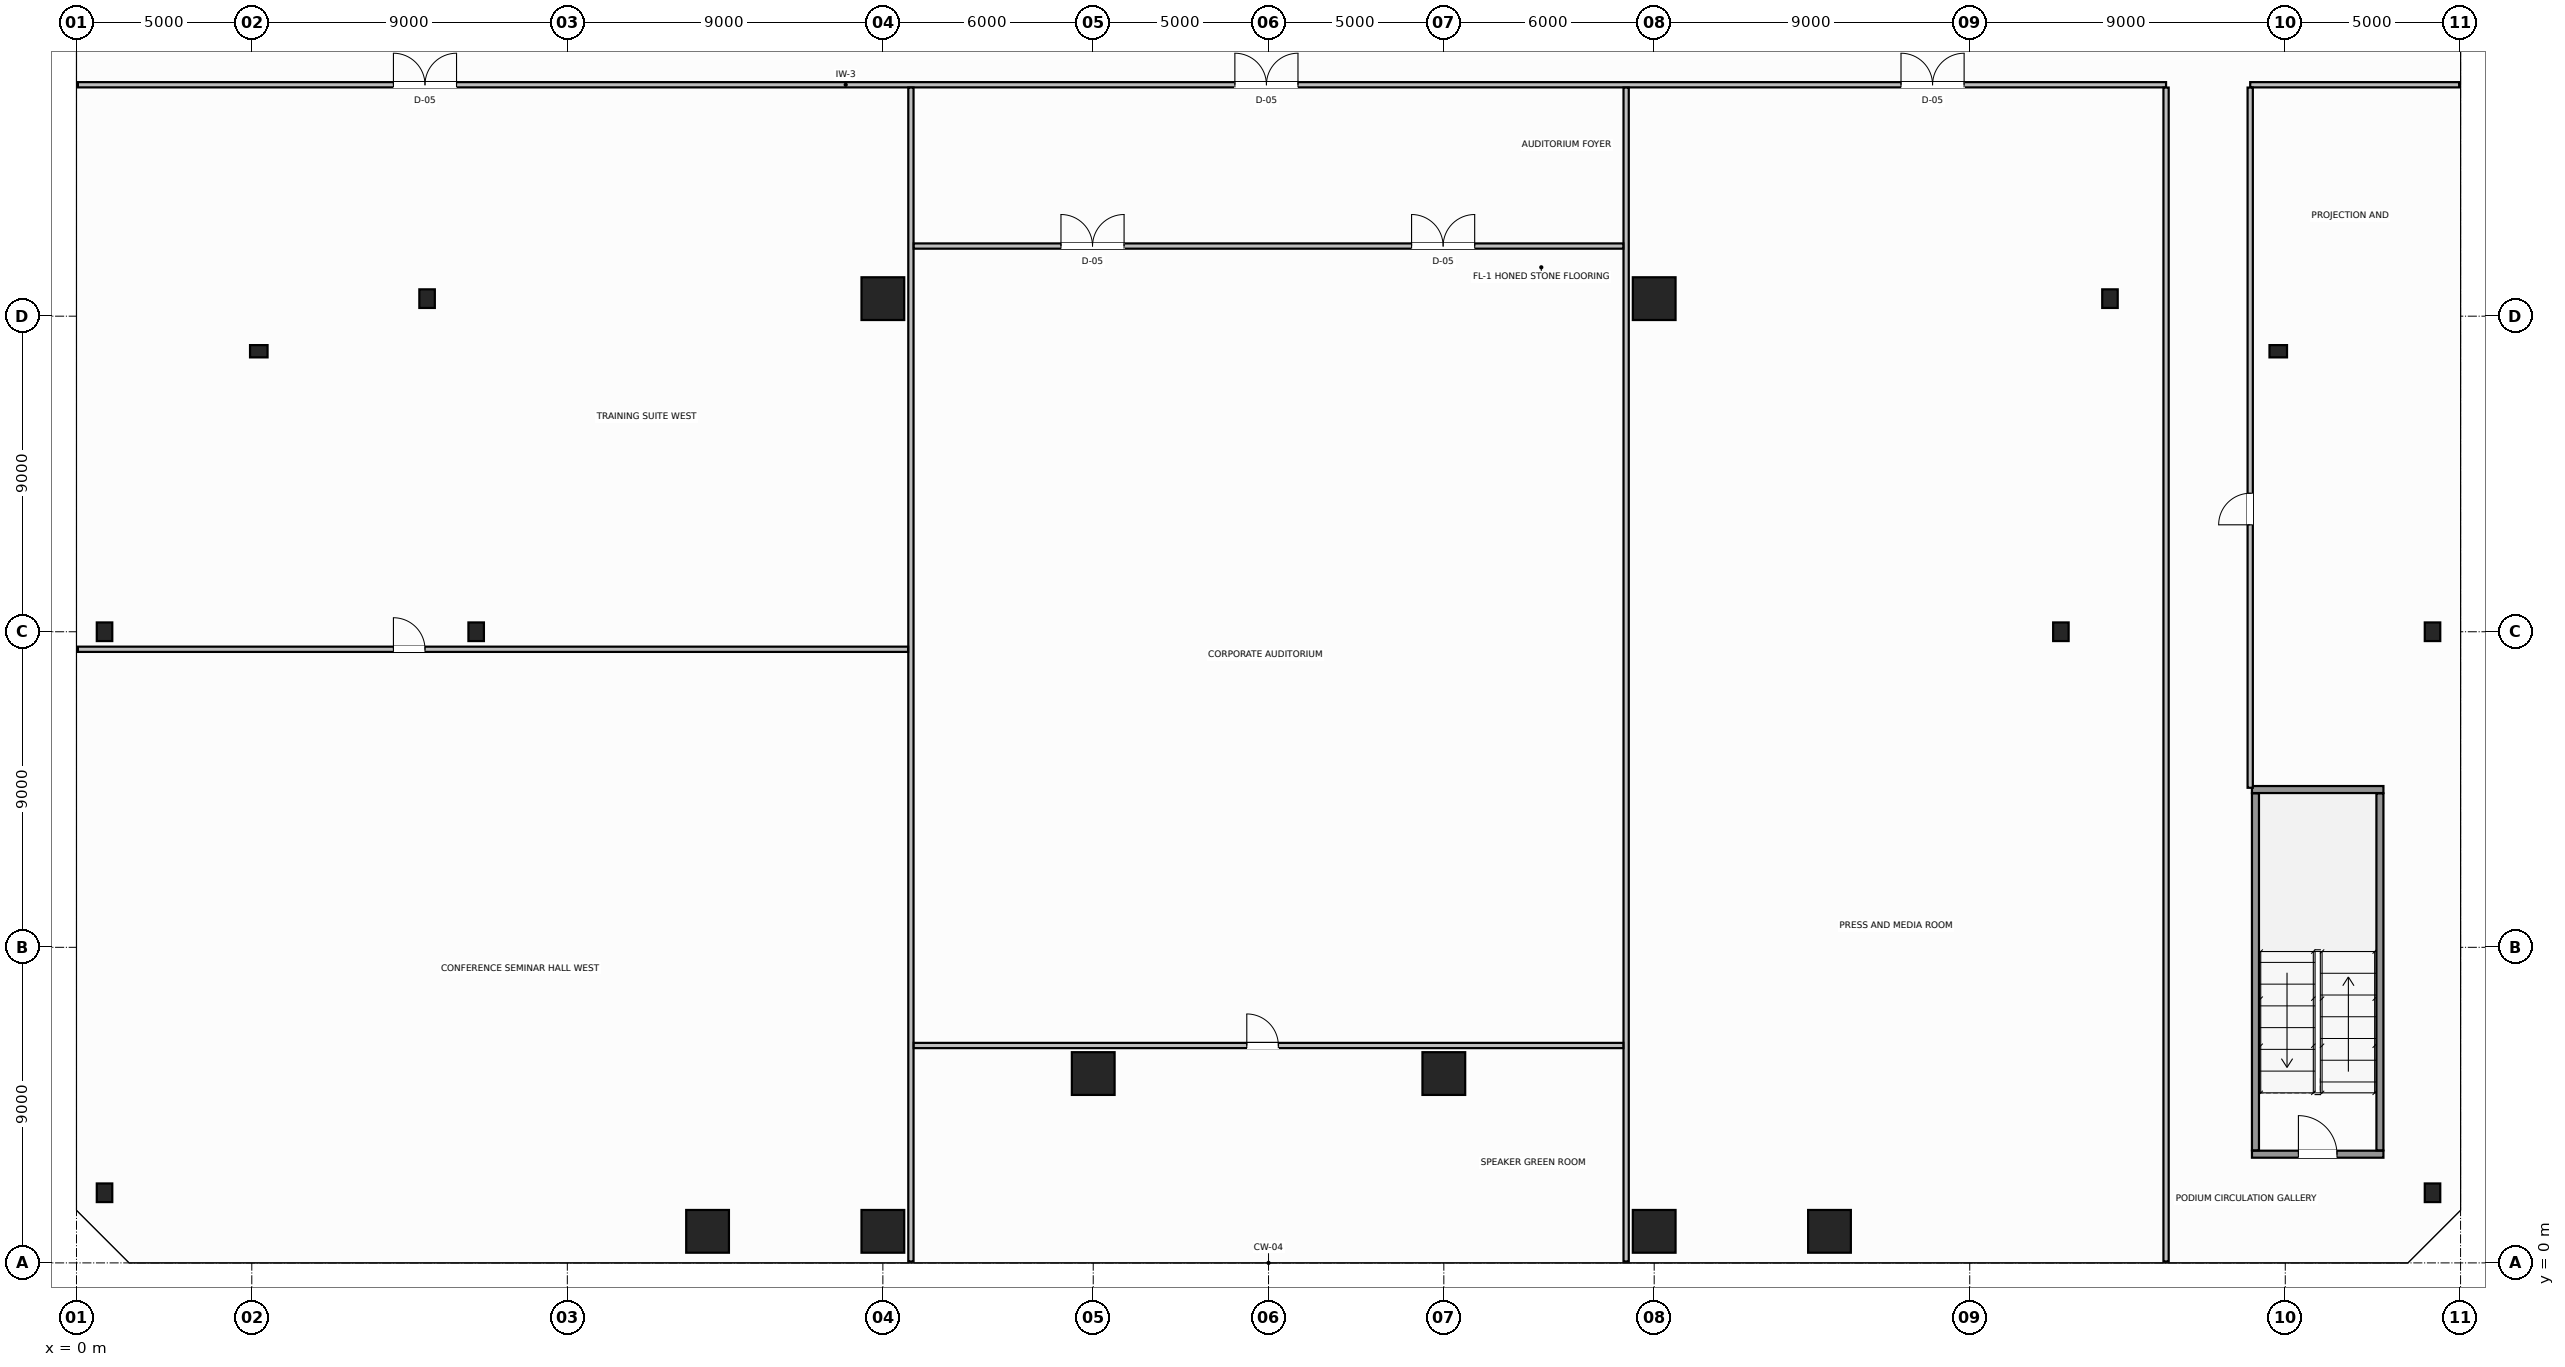
"""IFC4 building model, lengths in metres.
Left out: names, types, materials, properties, quantities, classifications, styles, units other than length and angle.
Written with IfcOpenShell. Run it as: python <this file> out.ifc"""

import sys

from ifc_helpers import new_model, si_unit, direction, frame, frame_2d, origin, origin_2d, place, context, subcontext, project, spatial, rectangle, hollow_circle, i_section, extrude, source, transform, mapped, element, fill, save


model = new_model("IFC4")
c1 = context("Model", 3, precision=1e-05, world=origin(), true_north=direction((0.0, 1.0)))
c2 = subcontext(c1, "Body", "Model", "MODEL_VIEW")
j1 = project(units=[si_unit("LENGTHUNIT", "METRE"), si_unit("PLANEANGLEUNIT", "RADIAN")], contexts=[c1])
p1 = place(None, origin())
s1 = spatial("IfcSite", under=j1, at=p1, CompositionType="ELEMENT")
p2 = place(p1, origin())
s2 = spatial("IfcBuilding", under=s1, at=p2, CompositionType="ELEMENT")
p3 = place(p2, frame((0.0, 0.0, 10.0)))
s3 = spatial("IfcBuildingStorey", under=s2, at=p3, CompositionType="ELEMENT", Elevation=10.0)
m1 = source(origin(), c2, "Body", "SweptSolid", [
    extrude(hollow_circle(Radius=0.61, WallThickness=0.05, at=origin_2d()), origin(), (0.0, 0.0, 1.0), 4.4),
])
for number, where, z_axis, x_axis in (
    (1, (18.0, 0.9, 0.0), (0.0, 0.0, 1.0), (1.0, 0.0, 0.0)),
    (2, (23.0, 0.9, 0.0), (0.0, 0.0, 1.0), (1.0, 0.0, 0.0)),
    (3, (29.0, 5.4, 0.0), (0.0, 0.0, 1.0), (1.0, 0.0, 0.0)),
    (4, (39.0, 5.4, 0.0), (0.0, 0.0, 1.0), (1.0, 0.0, 0.0)),
    (5, (45.0, 0.9, 0.0), (0.0, 0.0, 1.0), (1.0, 0.0, 0.0)),
    (6, (50.0, 0.9, 0.0), (0.0, 0.0, 1.0), (1.0, 0.0, 0.0)),
):
    element("IfcColumn", number, at=place(p3, frame(where, z_axis=z_axis, x_axis=x_axis)), inside=s3, PredefinedType="COLUMN", context=c2, shape_type="MappedRepresentation", body=[
        mapped(m1, transform((0.0, 0.0, 0.0), scale=1.0)),
    ])
m2 = source(origin(), c2, "Body", "SweptSolid", [
    extrude(i_section(OverallWidth=0.442, OverallDepth=0.531, WebThickness=0.065, FlangeThickness=0.076, FilletRadius=0.015, at=origin_2d()), origin(), (0.0, 0.0, 1.0), 4.4),
])
for number, where, z_axis, x_axis in (
    (7, (0.8, 2.0, 0.0), (0.0, 0.0, 1.0), (1.0, 0.0, 0.0)),
    (8, (0.8, 18.0, 0.0), (0.0, 0.0, 1.0), (1.0, 0.0, 0.0)),
    (9, (67.2, 2.0, 0.0), (0.0, 0.0, 1.0), (1.0, 0.0, 0.0)),
    (10, (67.2, 18.0, 0.0), (0.0, 0.0, 1.0), (1.0, 0.0, 0.0)),
    (11, (10.0, 27.5, 0.0), (0.0, 0.0, 1.0), (1.0, 0.0, 0.0)),
    (12, (11.4, 18.0, 0.0), (0.0, 0.0, 1.0), (1.0, 0.0, 0.0)),
    (13, (58.0, 27.5, 0.0), (0.0, 0.0, 1.0), (1.0, 0.0, 0.0)),
    (14, (56.6, 18.0, 0.0), (0.0, 0.0, 1.0), (1.0, 0.0, 0.0)),
):
    element("IfcColumn", number, at=place(p3, frame(where, z_axis=z_axis, x_axis=x_axis)), inside=s3, PredefinedType="COLUMN", context=c2, shape_type="MappedRepresentation", body=[
        mapped(m2, transform((0.0, 0.0, 0.0), scale=1.0)),
    ])
for number, where, z_axis, x_axis in (
    (15, (23.0, 27.5, 0.0), (0.0, 0.0, 1.0), (1.0, 0.0, 0.0)),
    (16, (45.0, 27.5, 0.0), (0.0, 0.0, 1.0), (1.0, 0.0, 0.0)),
):
    element("IfcColumn", number, at=place(p3, frame(where, z_axis=z_axis, x_axis=x_axis)), inside=s3, PredefinedType="COLUMN", context=c2, shape_type="MappedRepresentation", body=[
        mapped(m1, transform((0.0, 0.0, 0.0), scale=1.0)),
    ])
m3 = source(origin(), c2, "Body", "SweptSolid", [
    extrude(rectangle(XDim=0.5, YDim=0.35, at=origin_2d()), origin(), (0.0, 0.0, 1.0), 4.12),
])
for number, where, z_axis, x_axis in (
    (17, (5.2, 26.0, 0.0), (0.0, 0.0, 1.0), (1.0, 0.0, 0.0)),
    (18, (62.8, 26.0, 0.0), (0.0, 0.0, 1.0), (1.0, 0.0, 0.0)),
):
    element("IfcColumn", number, at=place(p3, frame(where, z_axis=z_axis, x_axis=x_axis)), inside=s3, PredefinedType="PILASTER", context=c2, shape_type="MappedRepresentation", body=[
        mapped(m3, transform((0.0, 0.0, 0.0), scale=1.0)),
    ])
p4 = place(p3, frame((62.05, 3.1, 0.0), z_axis=(0.0, 0.0, 1.0), x_axis=(1.0, 0.0, 0.0)))
e19 = element("IfcWall", 19, at=p4, inside=s3, PredefinedType="SOLIDWALL", context=c2, shape_type="SweptSolid", body=[
    extrude(rectangle(XDim=3.75, YDim=0.2, at=frame_2d((1.875, 0.0))), origin(), (0.0, 0.0, 1.0), 4.4),
])
p5 = place(p4, frame((1.325, 0.0, 0.0)))
e20 = element("IfcOpeningElement", 20, at=p5, cuts=e19, PredefinedType="OPENING", context=c2, shape_type="SweptSolid", body=[
    extrude(rectangle(XDim=1.1, YDim=2.15, at=frame_2d((0.55, 1.075))), frame((0.0, 0.11, 0.0), z_axis=(0.0, -1.0, 0.0), x_axis=(1.0, 0.0, 0.0)), (0.0, 0.0, 1.0), 0.22),
])
p6 = place(p3, frame((62.05, 13.5, 0.0), z_axis=(0.0, 0.0, 1.0), x_axis=(1.0, 0.0, 0.0)))
e21 = element("IfcWall", 21, at=p6, inside=s3, PredefinedType="SOLIDWALL", context=c2, shape_type="SweptSolid", body=[
    extrude(rectangle(XDim=3.75, YDim=0.2, at=frame_2d((1.875, 0.0))), origin(), (0.0, 0.0, 1.0), 4.4),
])
for number, where, z_axis, x_axis in (
    (22, (62.15, 3.21, 0.0), (0.0, 0.0, 1.0), (0.0, 1.0, 0.0)),
    (23, (65.7, 3.21, 0.0), (0.0, 0.0, 1.0), (0.0, 1.0, 0.0)),
):
    element("IfcWall", number, at=place(p3, frame(where, z_axis=z_axis, x_axis=x_axis)), inside=s3, PredefinedType="SOLIDWALL", context=c2, shape_type="SweptSolid", body=[
        extrude(rectangle(XDim=10.18, YDim=0.2, at=frame_2d((5.09, 0.0))), origin(), (0.0, 0.0, 1.0), 4.4),
    ])
p7 = place(p3, frame((0.04, 33.6, 0.0), z_axis=(0.0, 0.0, 1.0), x_axis=(1.0, 0.0, 0.0)))
e24 = element("IfcWall", 24, at=p7, inside=s3, PredefinedType="PARTITIONING", context=c2, shape_type="SweptSolid", body=[
    extrude(rectangle(XDim=59.56, YDim=0.15, at=frame_2d((29.78, 0.0))), origin(), (0.0, 0.0, 1.0), 4.12),
])
p8 = place(p7, frame((9.0, 0.0, 0.0)))
e25 = element("IfcOpeningElement", 25, at=p8, cuts=e24, PredefinedType="OPENING", context=c2, shape_type="SweptSolid", body=[
    extrude(rectangle(XDim=1.8, YDim=2.25, at=frame_2d((0.9, 1.125))), frame((0.0, 0.085, 0.0), z_axis=(0.0, -1.0, 0.0), x_axis=(1.0, 0.0, 0.0)), (0.0, 0.0, 1.0), 0.17),
])
p9 = place(p7, frame((33.0, 0.0, 0.0)))
e26 = element("IfcOpeningElement", 26, at=p9, cuts=e24, PredefinedType="OPENING", context=c2, shape_type="SweptSolid", body=[
    extrude(rectangle(XDim=1.8, YDim=2.25, at=frame_2d((0.9, 1.125))), frame((0.0, 0.085, 0.0), z_axis=(0.0, -1.0, 0.0), x_axis=(1.0, 0.0, 0.0)), (0.0, 0.0, 1.0), 0.17),
])
p10 = place(p7, frame((52.0, 0.0, 0.0)))
e27 = element("IfcOpeningElement", 27, at=p10, cuts=e24, PredefinedType="OPENING", context=c2, shape_type="SweptSolid", body=[
    extrude(rectangle(XDim=1.8, YDim=2.25, at=frame_2d((0.9, 1.125))), frame((0.0, 0.085, 0.0), z_axis=(0.0, -1.0, 0.0), x_axis=(1.0, 0.0, 0.0)), (0.0, 0.0, 1.0), 0.17),
])
p11 = place(p3, frame((62.0, 33.6, 0.0), z_axis=(0.0, 0.0, 1.0), x_axis=(1.0, 0.0, 0.0)))
e28 = element("IfcWall", 28, at=p11, inside=s3, PredefinedType="PARTITIONING", context=c2, shape_type="SweptSolid", body=[
    extrude(rectangle(XDim=5.96, YDim=0.15, at=frame_2d((2.98, 0.0))), origin(), (0.0, 0.0, 1.0), 4.12),
])
p12 = place(p3, frame((59.6, 0.04, 0.0), z_axis=(0.0, 0.0, 1.0), x_axis=(0.0, 1.0, 0.0)))
e29 = element("IfcWall", 29, at=p12, inside=s3, PredefinedType="PARTITIONING", context=c2, shape_type="SweptSolid", body=[
    extrude(rectangle(XDim=33.48, YDim=0.15, at=frame_2d((16.74, 0.0))), origin(), (0.0, 0.0, 1.0), 3.2),
])
p13 = place(p3, frame((62.0, 13.55, 0.0), z_axis=(0.0, 0.0, 1.0), x_axis=(0.0, 1.0, 0.0)))
e30 = element("IfcWall", 30, at=p13, inside=s3, PredefinedType="PARTITIONING", context=c2, shape_type="SweptSolid", body=[
    extrude(rectangle(XDim=19.97, YDim=0.15, at=frame_2d((9.985, 0.0))), origin(), (0.0, 0.0, 1.0), 4.12),
])
p14 = place(p13, frame((7.5, 0.0, 0.0)))
e31 = element("IfcOpeningElement", 31, at=p14, cuts=e30, PredefinedType="OPENING", context=c2, shape_type="SweptSolid", body=[
    extrude(rectangle(XDim=0.9, YDim=2.15, at=frame_2d((0.45, 1.075))), frame((0.0, 0.085, 0.0), z_axis=(0.0, -1.0, 0.0), x_axis=(1.0, 0.0, 0.0)), (0.0, 0.0, 1.0), 0.17),
])
for number, where, z_axis, x_axis in (
    (32, (23.8, 0.04, 0.0), (0.0, 0.0, 1.0), (0.0, 1.0, 0.0)),
    (33, (44.2, 0.04, 0.0), (0.0, 0.0, 1.0), (0.0, 1.0, 0.0)),
):
    element("IfcWall", number, at=place(p3, frame(where, z_axis=z_axis, x_axis=x_axis)), inside=s3, PredefinedType="PARTITIONING", context=c2, shape_type="SweptSolid", body=[
        extrude(rectangle(XDim=33.48, YDim=0.15, at=frame_2d((16.74, 0.0))), origin(), (0.0, 0.0, 1.0), 4.12),
    ])
p15 = place(p3, frame((23.88, 29.0, 0.0), z_axis=(0.0, 0.0, 1.0), x_axis=(1.0, 0.0, 0.0)))
e34 = element("IfcWall", 34, at=p15, inside=s3, PredefinedType="PARTITIONING", context=c2, shape_type="SweptSolid", body=[
    extrude(rectangle(XDim=20.24, YDim=0.15, at=frame_2d((10.12, 0.0))), origin(), (0.0, 0.0, 1.0), 4.12),
])
p16 = place(p15, frame((4.2, 0.0, 0.0)))
e35 = element("IfcOpeningElement", 35, at=p16, cuts=e34, PredefinedType="OPENING", context=c2, shape_type="SweptSolid", body=[
    extrude(rectangle(XDim=1.8, YDim=2.25, at=frame_2d((0.9, 1.125))), frame((0.0, 0.085, 0.0), z_axis=(0.0, -1.0, 0.0), x_axis=(1.0, 0.0, 0.0)), (0.0, 0.0, 1.0), 0.17),
])
p17 = place(p15, frame((14.2, 0.0, 0.0)))
e36 = element("IfcOpeningElement", 36, at=p17, cuts=e34, PredefinedType="OPENING", context=c2, shape_type="SweptSolid", body=[
    extrude(rectangle(XDim=1.8, YDim=2.25, at=frame_2d((0.9, 1.125))), frame((0.0, 0.085, 0.0), z_axis=(0.0, -1.0, 0.0), x_axis=(1.0, 0.0, 0.0)), (0.0, 0.0, 1.0), 0.17),
])
p18 = place(p3, frame((23.88, 6.2, 0.0), z_axis=(0.0, 0.0, 1.0), x_axis=(1.0, 0.0, 0.0)))
e37 = element("IfcWall", 37, at=p18, inside=s3, PredefinedType="PARTITIONING", context=c2, shape_type="SweptSolid", body=[
    extrude(rectangle(XDim=20.24, YDim=0.15, at=frame_2d((10.12, 0.0))), origin(), (0.0, 0.0, 1.0), 4.12),
])
p19 = place(p18, frame((9.5, 0.0, 0.0)))
e38 = element("IfcOpeningElement", 38, at=p19, cuts=e37, PredefinedType="OPENING", context=c2, shape_type="SweptSolid", body=[
    extrude(rectangle(XDim=0.9, YDim=2.15, at=frame_2d((0.45, 1.075))), frame((0.0, 0.085, 0.0), z_axis=(0.0, -1.0, 0.0), x_axis=(1.0, 0.0, 0.0)), (0.0, 0.0, 1.0), 0.17),
])
p20 = place(p3, frame((0.04, 17.5, 0.0), z_axis=(0.0, 0.0, 1.0), x_axis=(1.0, 0.0, 0.0)))
e39 = element("IfcWall", 39, at=p20, inside=s3, PredefinedType="PARTITIONING", context=c2, shape_type="SweptSolid", body=[
    extrude(rectangle(XDim=23.68, YDim=0.15, at=frame_2d((11.84, 0.0))), origin(), (0.0, 0.0, 1.0), 4.12),
])
p21 = place(p20, frame((9.0, 0.0, 0.0)))
e40 = element("IfcOpeningElement", 40, at=p21, cuts=e39, PredefinedType="OPENING", context=c2, shape_type="SweptSolid", body=[
    extrude(rectangle(XDim=0.9, YDim=2.15, at=frame_2d((0.45, 1.075))), frame((0.0, 0.085, 0.0), z_axis=(0.0, -1.0, 0.0), x_axis=(1.0, 0.0, 0.0)), (0.0, 0.0, 1.0), 0.17),
])
m4 = source(origin(), c2, "Body", "SweptSolid", [
    extrude(rectangle(XDim=1.1, YDim=2.15, at=frame_2d((0.55, 1.075))), frame((0.0, 0.025, 0.0), z_axis=(0.0, -1.0, 0.0), x_axis=(1.0, 0.0, 0.0)), (0.0, 0.0, 1.0), 0.05),
])
p22 = place(p5, origin())
e41 = element("IfcDoor", 41, at=p22, inside=s3, OperationType="SINGLE_SWING_RIGHT", PredefinedType="DOOR", context=c2, shape_type="MappedRepresentation", body=[
    mapped(m4, transform((0.0, 0.0, 0.0), scale=1.0)),
])
fill(e20, e41)
m5 = source(origin(), c2, "Body", "SweptSolid", [
    extrude(rectangle(XDim=1.8, YDim=2.25, at=frame_2d((0.9, 1.125))), frame((0.0, 0.025, 0.0), z_axis=(0.0, -1.0, 0.0), x_axis=(1.0, 0.0, 0.0)), (0.0, 0.0, 1.0), 0.05),
])
p23 = place(p8, origin())
e42 = element("IfcDoor", 42, at=p23, inside=s3, OperationType="DOUBLE_DOOR_SINGLE_SWING", PredefinedType="DOOR", context=c2, shape_type="MappedRepresentation", body=[
    mapped(m5, transform((0.0, 0.0, 0.0), scale=1.0)),
])
fill(e25, e42)
m6 = source(origin(), c2, "Body", "SweptSolid", [
    extrude(rectangle(XDim=0.9, YDim=2.15, at=frame_2d((0.45, 1.075))), frame((0.0, 0.025, 0.0), z_axis=(0.0, -1.0, 0.0), x_axis=(1.0, 0.0, 0.0)), (0.0, 0.0, 1.0), 0.05),
])
p24 = place(p21, origin())
e43 = element("IfcDoor", 43, at=p24, inside=s3, OperationType="SINGLE_SWING_LEFT", PredefinedType="DOOR", context=c2, shape_type="MappedRepresentation", body=[
    mapped(m6, transform((0.0, 0.0, 0.0), scale=1.0)),
])
fill(e40, e43)
p25 = place(p9, origin())
e44 = element("IfcDoor", 44, at=p25, inside=s3, OperationType="DOUBLE_DOOR_SINGLE_SWING", PredefinedType="DOOR", context=c2, shape_type="MappedRepresentation", body=[
    mapped(m5, transform((0.0, 0.0, 0.0), scale=1.0)),
])
fill(e26, e44)
p26 = place(p16, origin())
e45 = element("IfcDoor", 45, at=p26, inside=s3, OperationType="DOUBLE_DOOR_SINGLE_SWING", PredefinedType="DOOR", context=c2, shape_type="MappedRepresentation", body=[
    mapped(m5, transform((0.0, 0.0, 0.0), scale=1.0)),
])
fill(e35, e45)
p27 = place(p17, origin())
e46 = element("IfcDoor", 46, at=p27, inside=s3, OperationType="DOUBLE_DOOR_SINGLE_SWING", PredefinedType="DOOR", context=c2, shape_type="MappedRepresentation", body=[
    mapped(m5, transform((0.0, 0.0, 0.0), scale=1.0)),
])
fill(e36, e46)
p28 = place(p19, origin())
e47 = element("IfcDoor", 47, at=p28, inside=s3, OperationType="SINGLE_SWING_RIGHT", PredefinedType="DOOR", context=c2, shape_type="MappedRepresentation", body=[
    mapped(m6, transform((0.0, 0.0, 0.0), scale=1.0)),
])
fill(e38, e47)
p29 = place(p10, origin())
e48 = element("IfcDoor", 48, at=p29, inside=s3, OperationType="DOUBLE_DOOR_SINGLE_SWING", PredefinedType="DOOR", context=c2, shape_type="MappedRepresentation", body=[
    mapped(m5, transform((0.0, 0.0, 0.0), scale=1.0)),
])
fill(e27, e48)
p30 = place(p14, origin())
e49 = element("IfcDoor", 49, at=p30, inside=s3, OperationType="SINGLE_SWING_LEFT", PredefinedType="DOOR", context=c2, shape_type="MappedRepresentation", body=[
    mapped(m6, transform((0.0, 0.0, 0.0), scale=1.0)),
])
fill(e31, e49)
save(model, sys.argv[1])
